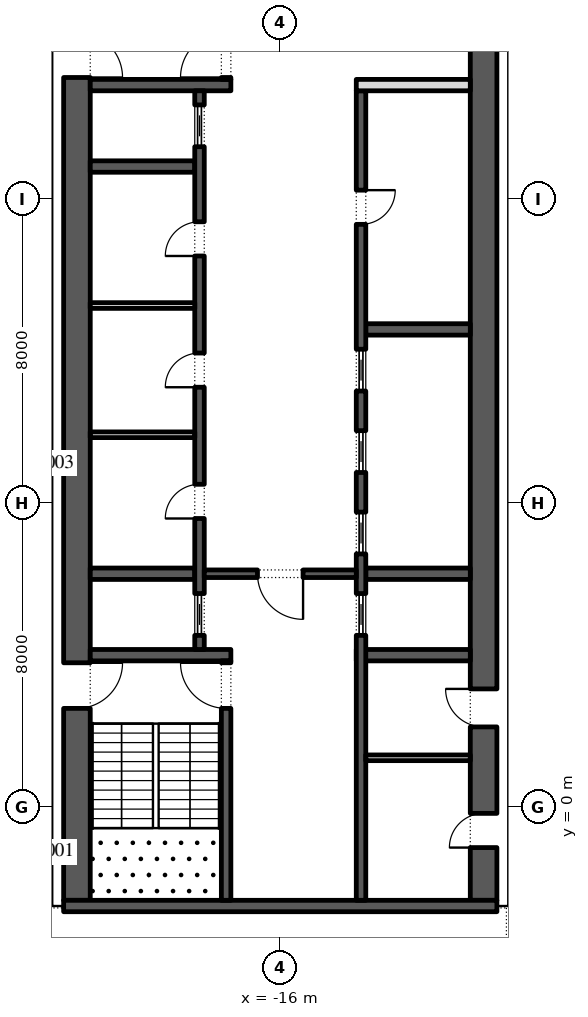
"""IFC4 building model, lengths in metres.
Left out: names, types, materials, properties, quantities, classifications, styles, units other than length and angle.
Written with IfcOpenShell. Run it as: python <this file> out.ifc"""

import sys

from ifc_helpers import new_model, si_unit, direction, frame, frame_2d, origin, place, context, subcontext, project, spatial, rectangle, extrude, element, fill, save


model = new_model("IFC4")
c1 = context("Model", 3, precision=1e-05, world=origin(), true_north=direction((0.0, 1.0)))
c2 = subcontext(c1, "Body", "Model", "MODEL_VIEW")
j1 = project(units=[si_unit("LENGTHUNIT", "METRE"), si_unit("PLANEANGLEUNIT", "RADIAN")], contexts=[c1])
p1 = place(None, origin())
s1 = spatial("IfcSite", under=j1, at=p1, CompositionType="ELEMENT")
p2 = place(p1, origin())
s2 = spatial("IfcBuilding", under=s1, at=p2, CompositionType="ELEMENT")
p3 = place(p2, frame((0.0, 0.0, 175.8)))
s3 = spatial("IfcBuildingStorey", under=s2, at=p3, CompositionType="ELEMENT", Elevation=175.8)
p4 = place(p3, frame((-33.157, 30.092, 0.0), z_axis=(0.0, 0.0, 1.0), x_axis=(0.224950279389, -0.974370243697, 0.0)))
e1 = element("IfcWall", 1, at=p4, inside=s3, PredefinedType="STANDARD", context=c2, shape_type="SweptSolid", body=[
    extrude(rectangle(XDim=49.5, YDim=0.3, at=frame_2d((24.75, 0.0))), origin(), (0.0, 0.0, 1.0), 4.0),
])
p5 = place(p4, frame((2.207, 0.0, 0.0)))
e2 = element("IfcOpeningElement", 2, at=p5, cuts=e1, PredefinedType="OPENING", context=c2, shape_type="SweptSolid", body=[
    extrude(rectangle(XDim=2.4, YDim=3.5, at=frame_2d((1.2, 1.75))), frame((0.0, 0.16, 0.0), z_axis=(0.0, -1.0, 0.0), x_axis=(1.0, 0.0, 0.0)), (0.0, 0.0, 1.0), 0.32),
])
p6 = place(p4, frame((8.121, 0.0, 0.45)))
e3 = element("IfcOpeningElement", 3, at=p6, cuts=e1, PredefinedType="OPENING", context=c2, shape_type="SweptSolid", body=[
    extrude(rectangle(XDim=4.5, YDim=2.825, at=frame_2d((2.25, 1.413))), frame((0.0, 0.16, 0.0), z_axis=(0.0, -1.0, 0.0), x_axis=(1.0, 0.0, 0.0)), (0.0, 0.0, 1.0), 0.32),
])
p7 = place(p4, frame((15.236, 0.0, 0.45)))
e4 = element("IfcOpeningElement", 4, at=p7, cuts=e1, PredefinedType="OPENING", context=c2, shape_type="SweptSolid", body=[
    extrude(rectangle(XDim=4.5, YDim=2.95, at=frame_2d((2.25, 1.475))), frame((0.0, 0.16, 0.0), z_axis=(0.0, -1.0, 0.0), x_axis=(1.0, 0.0, 0.0)), (0.0, 0.0, 1.0), 0.32),
])
p8 = place(p4, frame((22.35, 0.0, 0.45)))
e5 = element("IfcOpeningElement", 5, at=p8, cuts=e1, PredefinedType="OPENING", context=c2, shape_type="SweptSolid", body=[
    extrude(rectangle(XDim=4.5, YDim=3.0, at=frame_2d((2.25, 1.5))), frame((0.0, 0.16, 0.0), z_axis=(0.0, -1.0, 0.0), x_axis=(1.0, 0.0, 0.0)), (0.0, 0.0, 1.0), 0.32),
])
p9 = place(p4, frame((30.514, 0.0, 0.0)))
e6 = element("IfcOpeningElement", 6, at=p9, cuts=e1, PredefinedType="OPENING", context=c2, shape_type="SweptSolid", body=[
    extrude(rectangle(XDim=2.4, YDim=3.5, at=frame_2d((1.2, 1.75))), frame((0.0, 0.16, 0.0), z_axis=(0.0, -1.0, 0.0), x_axis=(1.0, 0.0, 0.0)), (0.0, 0.0, 1.0), 0.32),
])
p10 = place(p4, frame((36.579, 0.0, 0.45)))
e7 = element("IfcOpeningElement", 7, at=p10, cuts=e1, PredefinedType="OPENING", context=c2, shape_type="SweptSolid", body=[
    extrude(rectangle(XDim=4.5, YDim=3.05, at=frame_2d((2.25, 1.525))), frame((0.0, 0.16, 0.0), z_axis=(0.0, -1.0, 0.0), x_axis=(1.0, 0.0, 0.0)), (0.0, 0.0, 1.0), 0.32),
])
p11 = place(p4, frame((43.693, 0.0, 0.45)))
e8 = element("IfcOpeningElement", 8, at=p11, cuts=e1, PredefinedType="OPENING", context=c2, shape_type="SweptSolid", body=[
    extrude(rectangle(XDim=4.5, YDim=3.05, at=frame_2d((2.25, 1.525))), frame((0.0, 0.16, 0.0), z_axis=(0.0, -1.0, 0.0), x_axis=(1.0, 0.0, 0.0)), (0.0, 0.0, 1.0), 0.32),
])
p12 = place(p3, frame((-21.35, -2.45, 0.0), z_axis=(0.0, 0.0, 1.0), x_axis=(0.0, 1.0, 0.0)))
e9 = element("IfcWall", 9, at=p12, inside=s3, PredefinedType="SHEAR", context=c2, shape_type="SweptSolid", body=[
    extrude(rectangle(XDim=27.9, YDim=0.7, at=frame_2d((13.95, 0.0))), origin(), (0.0, 0.0, 1.0), 4.0),
])
p13 = place(p12, frame((5.05, 0.0, 0.0)))
e10 = element("IfcOpeningElement", 10, at=p13, cuts=e9, PredefinedType="OPENING", context=c2, shape_type="SweptSolid", body=[
    extrude(rectangle(XDim=1.2, YDim=2.1, at=frame_2d((0.6, 1.05))), frame((0.0, 0.36, 0.0), z_axis=(0.0, -1.0, 0.0), x_axis=(1.0, 0.0, 0.0)), (0.0, 0.0, 1.0), 0.72),
])
p14 = place(p12, frame((21.65, 0.0, 0.0)))
e11 = element("IfcOpeningElement", 11, at=p14, cuts=e9, PredefinedType="OPENING", context=c2, shape_type="SweptSolid", body=[
    extrude(rectangle(XDim=1.2, YDim=2.1, at=frame_2d((0.6, 1.05))), frame((0.0, 0.36, 0.0), z_axis=(0.0, -1.0, 0.0), x_axis=(1.0, 0.0, 0.0)), (0.0, 0.0, 1.0), 0.72),
])
p15 = place(p3, frame((-10.65, -2.45, 0.0), z_axis=(0.0, 0.0, 1.0), x_axis=(0.0, 1.0, 0.0)))
e12 = element("IfcWall", 12, at=p15, inside=s3, PredefinedType="SHEAR", context=c2, shape_type="SweptSolid", body=[
    extrude(rectangle(XDim=27.9, YDim=0.7, at=frame_2d((13.95, 0.0))), origin(), (0.0, 0.0, 1.0), 4.0),
])
p16 = place(p15, frame((23.65, 0.0, 0.0)))
e13 = element("IfcOpeningElement", 13, at=p16, cuts=e12, PredefinedType="OPENING", context=c2, shape_type="SweptSolid", body=[
    extrude(rectangle(XDim=2.4, YDim=2.1, at=frame_2d((1.2, 1.05))), frame((0.0, 0.36, 0.0), z_axis=(0.0, -1.0, 0.0), x_axis=(1.0, 0.0, 0.0)), (0.0, 0.0, 1.0), 0.72),
])
p17 = place(p15, frame((1.387, 0.0, 0.0)))
e14 = element("IfcOpeningElement", 14, at=p17, cuts=e12, PredefinedType="OPENING", context=c2, shape_type="SweptSolid", body=[
    extrude(rectangle(XDim=0.9, YDim=2.1, at=frame_2d((0.45, 1.05))), frame((0.0, 0.36, 0.0), z_axis=(0.0, -1.0, 0.0), x_axis=(1.0, 0.0, 0.0)), (0.0, 0.0, 1.0), 0.72),
])
p18 = place(p15, frame((4.562, 0.0, 0.0)))
e15 = element("IfcOpeningElement", 15, at=p18, cuts=e12, PredefinedType="OPENING", context=c2, shape_type="SweptSolid", body=[
    extrude(rectangle(XDim=1.0, YDim=2.1, at=frame_2d((0.5, 1.05))), frame((0.0, 0.36, 0.0), z_axis=(0.0, -1.0, 0.0), x_axis=(1.0, 0.0, 0.0)), (0.0, 0.0, 1.0), 0.72),
])
p19 = place(p3, frame((-21.7, -2.6, 0.0), z_axis=(0.0, 0.0, 1.0), x_axis=(1.0, 0.0, 0.0)))
e16 = element("IfcWall", 16, at=p19, inside=s3, PredefinedType="SHEAR", context=c2, shape_type="SweptSolid", body=[
    extrude(rectangle(XDim=11.4, YDim=0.3, at=frame_2d((5.7, 0.0))), origin(), (0.0, 0.0, 1.0), 4.0),
])
p20 = place(p3, frame((-21.0, 4.0, 0.0), z_axis=(0.0, 0.0, 1.0), x_axis=(1.0, 0.0, 0.0)))
e17 = element("IfcWall", 17, at=p20, inside=s3, PredefinedType="SHEAR", context=c2, shape_type="SweptSolid", body=[
    extrude(rectangle(XDim=3.7, YDim=0.3, at=frame_2d((1.85, 0.0))), origin(), (0.0, 0.0, 1.0), 4.0),
])
p21 = place(p3, frame((-17.425, -2.45, 0.0), z_axis=(0.0, 0.0, 1.0), x_axis=(0.0, 1.0, 0.0)))
e18 = element("IfcWall", 18, at=p21, inside=s3, PredefinedType="SHEAR", context=c2, shape_type="SweptSolid", body=[
    extrude(rectangle(XDim=6.3, YDim=0.25, at=frame_2d((3.15, 0.0))), origin(), (0.0, 0.0, 1.0), 4.0),
])
p22 = place(p21, frame((5.05, 0.0, 0.0)))
e19 = element("IfcOpeningElement", 19, at=p22, cuts=e18, PredefinedType="OPENING", context=c2, shape_type="SweptSolid", body=[
    extrude(rectangle(XDim=1.2, YDim=2.1, at=frame_2d((0.6, 1.05))), frame((0.0, 0.135, 0.0), z_axis=(0.0, -1.0, 0.0), x_axis=(1.0, 0.0, 0.0)), (0.0, 0.0, 1.0), 0.27),
])
p23 = place(p3, frame((-21.0, 19.0, 0.0), z_axis=(0.0, 0.0, 1.0), x_axis=(1.0, 0.0, 0.0)))
e20 = element("IfcWall", 20, at=p23, inside=s3, PredefinedType="SHEAR", context=c2, shape_type="SweptSolid", body=[
    extrude(rectangle(XDim=3.7, YDim=0.3, at=frame_2d((1.85, 0.0))), origin(), (0.0, 0.0, 1.0), 4.0),
])
p24 = place(p3, frame((-17.425, 19.15, 0.0), z_axis=(0.0, 0.0, 1.0), x_axis=(0.0, 1.0, 0.0)))
e21 = element("IfcWall", 21, at=p24, inside=s3, PredefinedType="SHEAR", context=c2, shape_type="SweptSolid", body=[
    extrude(rectangle(XDim=6.3, YDim=0.25, at=frame_2d((3.15, 0.0))), origin(), (0.0, 0.0, 1.0), 4.0),
])
p25 = place(p24, frame((0.05, 0.0, 0.0)))
e22 = element("IfcOpeningElement", 22, at=p25, cuts=e21, PredefinedType="OPENING", context=c2, shape_type="SweptSolid", body=[
    extrude(rectangle(XDim=1.2, YDim=2.1, at=frame_2d((0.6, 1.05))), frame((0.0, 0.135, 0.0), z_axis=(0.0, -1.0, 0.0), x_axis=(1.0, 0.0, 0.0)), (0.0, 0.0, 1.0), 0.27),
])
for number, where, z_axis, x_axis in (
    (23, (-21.0, 6.143, 0.0), (0.0, 0.0, 1.0), (1.0, 0.0, 0.0)),
    (24, (-21.0, 16.857, 0.0), (0.0, 0.0, 1.0), (1.0, 0.0, 0.0)),
):
    element("IfcWall", number, at=place(p3, frame(where, z_axis=z_axis, x_axis=x_axis)), inside=s3, PredefinedType="SHEAR", context=c2, shape_type="SweptSolid", body=[
        extrude(rectangle(XDim=2.75, YDim=0.3, at=frame_2d((1.375, 0.0))), origin(), (0.0, 0.0, 1.0), 4.0),
    ])
p26 = place(p3, frame((-18.125, 4.15, 0.0), z_axis=(0.0, 0.0, 1.0), x_axis=(0.0, 1.0, 0.0)))
e25 = element("IfcWall", 25, at=p26, inside=s3, PredefinedType="SHEAR", context=c2, shape_type="SweptSolid", body=[
    extrude(rectangle(XDim=14.7, YDim=0.25, at=frame_2d((7.35, 0.0))), origin(), (0.0, 0.0, 1.0), 4.0),
])
p27 = place(p26, frame((3.446, 0.0, 0.0)))
e26 = element("IfcOpeningElement", 26, at=p27, cuts=e25, PredefinedType="OPENING", context=c2, shape_type="SweptSolid", body=[
    extrude(rectangle(XDim=0.9, YDim=2.1, at=frame_2d((0.45, 1.05))), frame((0.0, 0.135, 0.0), z_axis=(0.0, -1.0, 0.0), x_axis=(1.0, 0.0, 0.0)), (0.0, 0.0, 1.0), 0.27),
])
p28 = place(p26, frame((6.9, 0.0, 0.0)))
e27 = element("IfcOpeningElement", 27, at=p28, cuts=e25, PredefinedType="OPENING", context=c2, shape_type="SweptSolid", body=[
    extrude(rectangle(XDim=0.9, YDim=2.1, at=frame_2d((0.45, 1.05))), frame((0.0, 0.135, 0.0), z_axis=(0.0, -1.0, 0.0), x_axis=(1.0, 0.0, 0.0)), (0.0, 0.0, 1.0), 0.27),
])
p29 = place(p26, frame((10.354, 0.0, 0.0)))
e28 = element("IfcOpeningElement", 28, at=p29, cuts=e25, PredefinedType="OPENING", context=c2, shape_type="SweptSolid", body=[
    extrude(rectangle(XDim=0.9, YDim=2.1, at=frame_2d((0.45, 1.05))), frame((0.0, 0.135, 0.0), z_axis=(0.0, -1.0, 0.0), x_axis=(1.0, 0.0, 0.0)), (0.0, 0.0, 1.0), 0.27),
])
p30 = place(p26, frame((0.371, 0.0, 0.0)))
e29 = element("IfcOpeningElement", 29, at=p30, cuts=e25, PredefinedType="OPENING", context=c2, shape_type="SweptSolid", body=[
    extrude(rectangle(XDim=1.1, YDim=2.1, at=frame_2d((0.55, 1.05))), frame((0.0, 0.135, 0.0), z_axis=(0.0, -1.0, 0.0), x_axis=(1.0, 0.0, 0.0)), (0.0, 0.0, 1.0), 0.27),
])
p31 = place(p26, frame((13.229, 0.0, 0.0)))
e30 = element("IfcOpeningElement", 30, at=p31, cuts=e25, PredefinedType="OPENING", context=c2, shape_type="SweptSolid", body=[
    extrude(rectangle(XDim=1.1, YDim=2.1, at=frame_2d((0.55, 1.05))), frame((0.0, 0.135, 0.0), z_axis=(0.0, -1.0, 0.0), x_axis=(1.0, 0.0, 0.0)), (0.0, 0.0, 1.0), 0.27),
])
for number, where, z_axis, x_axis in (
    (31, (-21.0, 9.8, 0.0), (0.0, 0.0, 1.0), (1.0, 0.0, 0.0)),
    (32, (-21.0, 13.2, 0.0), (0.0, 0.0, 1.0), (1.0, 0.0, 0.0)),
):
    element("IfcWall", number, at=place(p3, frame(where, z_axis=z_axis, x_axis=x_axis)), inside=s3, PredefinedType="PARTITIONING", context=c2, shape_type="SweptSolid", body=[
        extrude(rectangle(XDim=2.75, YDim=0.15, at=frame_2d((1.375, 0.0))), origin(), (0.0, 0.0, 1.0), 4.0),
    ])
p32 = place(p3, frame((-14.0, 4.0, 0.0), z_axis=(0.0, 0.0, 1.0), x_axis=(1.0, 0.0, 0.0)))
e33 = element("IfcWall", 33, at=p32, inside=s3, PredefinedType="SHEAR", context=c2, shape_type="SweptSolid", body=[
    extrude(rectangle(XDim=3.0, YDim=0.3, at=frame_2d((1.5, 0.0))), origin(), (0.0, 0.0, 1.0), 4.0),
])
for number, where, z_axis, x_axis in (
    (34, (-13.75, 6.143, 0.0), (0.0, 0.0, 1.0), (1.0, 0.0, 0.0)),
    (35, (-13.75, 12.571, 0.0), (0.0, 0.0, 1.0), (1.0, 0.0, 0.0)),
):
    element("IfcWall", number, at=place(p3, frame(where, z_axis=z_axis, x_axis=x_axis)), inside=s3, PredefinedType="SHEAR", context=c2, shape_type="SweptSolid", body=[
        extrude(rectangle(XDim=2.75, YDim=0.3, at=frame_2d((1.375, 0.0))), origin(), (0.0, 0.0, 1.0), 4.0),
    ])
p33 = place(p3, frame((-13.875, -2.45, 0.0), z_axis=(0.0, 0.0, 1.0), x_axis=(0.0, 1.0, 0.0)))
e36 = element("IfcWall", 36, at=p33, inside=s3, PredefinedType="SHEAR", context=c2, shape_type="SweptSolid", body=[
    extrude(rectangle(XDim=21.3, YDim=0.25, at=frame_2d((10.65, 0.0))), origin(), (0.0, 0.0, 1.0), 4.0),
])
p34 = place(p33, frame((17.786, 0.0, 0.0)))
e37 = element("IfcOpeningElement", 37, at=p34, cuts=e36, PredefinedType="OPENING", context=c2, shape_type="SweptSolid", body=[
    extrude(rectangle(XDim=0.9, YDim=2.1, at=frame_2d((0.45, 1.05))), frame((0.0, 0.135, 0.0), z_axis=(0.0, -1.0, 0.0), x_axis=(1.0, 0.0, 0.0)), (0.0, 0.0, 1.0), 0.27),
])
p35 = place(p33, frame((6.971, 0.0, 0.0)))
e38 = element("IfcOpeningElement", 38, at=p35, cuts=e36, PredefinedType="OPENING", context=c2, shape_type="SweptSolid", body=[
    extrude(rectangle(XDim=1.1, YDim=2.1, at=frame_2d((0.55, 1.05))), frame((0.0, 0.135, 0.0), z_axis=(0.0, -1.0, 0.0), x_axis=(1.0, 0.0, 0.0)), (0.0, 0.0, 1.0), 0.27),
])
p36 = place(p33, frame((9.114, 0.0, 0.0)))
e39 = element("IfcOpeningElement", 39, at=p36, cuts=e36, PredefinedType="OPENING", context=c2, shape_type="SweptSolid", body=[
    extrude(rectangle(XDim=1.1, YDim=2.1, at=frame_2d((0.55, 1.05))), frame((0.0, 0.135, 0.0), z_axis=(0.0, -1.0, 0.0), x_axis=(1.0, 0.0, 0.0)), (0.0, 0.0, 1.0), 0.27),
])
p37 = place(p33, frame((11.257, 0.0, 0.0)))
e40 = element("IfcOpeningElement", 40, at=p37, cuts=e36, PredefinedType="OPENING", context=c2, shape_type="SweptSolid", body=[
    extrude(rectangle(XDim=1.1, YDim=2.1, at=frame_2d((0.55, 1.05))), frame((0.0, 0.135, 0.0), z_axis=(0.0, -1.0, 0.0), x_axis=(1.0, 0.0, 0.0)), (0.0, 0.0, 1.0), 0.27),
])
p38 = place(p33, frame((13.4, 0.0, 0.0)))
e41 = element("IfcOpeningElement", 41, at=p38, cuts=e36, PredefinedType="OPENING", context=c2, shape_type="SweptSolid", body=[
    extrude(rectangle(XDim=1.1, YDim=2.1, at=frame_2d((0.55, 1.05))), frame((0.0, 0.135, 0.0), z_axis=(0.0, -1.0, 0.0), x_axis=(1.0, 0.0, 0.0)), (0.0, 0.0, 1.0), 0.27),
])
p39 = place(p3, frame((-14.0, 19.0, 0.0), z_axis=(0.0, 0.0, 1.0), x_axis=(1.0, 0.0, 0.0)))
e42 = element("IfcWall", 42, at=p39, inside=s3, PredefinedType="PARTITIONING", context=c2, shape_type="SweptSolid", body=[
    extrude(rectangle(XDim=3.0, YDim=0.3, at=frame_2d((1.5, 0.0))), origin(), (0.0, 0.0, 1.0), 4.0),
])
p40 = place(p3, frame((-18.0, 6.143, 0.0), z_axis=(0.0, 0.0, 1.0), x_axis=(1.0, 0.0, 0.0)))
e43 = element("IfcWall", 43, at=p40, inside=s3, PredefinedType="SHEAR", context=c2, shape_type="SweptSolid", body=[
    extrude(rectangle(XDim=4.0, YDim=0.2, at=frame_2d((2.0, 0.0))), origin(), (0.0, 0.0, 1.0), 4.0),
])
p41 = place(p40, frame((1.4, 0.0, 0.0)))
e44 = element("IfcOpeningElement", 44, at=p41, cuts=e43, PredefinedType="OPENING", context=c2, shape_type="SweptSolid", body=[
    extrude(rectangle(XDim=1.2, YDim=2.1, at=frame_2d((0.6, 1.05))), frame((0.0, 0.11, 0.0), z_axis=(0.0, -1.0, 0.0), x_axis=(1.0, 0.0, 0.0)), (0.0, 0.0, 1.0), 0.22),
])
p42 = place(p3, frame((-13.75, 1.3, 0.0), z_axis=(0.0, 0.0, 1.0), x_axis=(1.0, 0.0, 0.0)))
e45 = element("IfcWall", 45, at=p42, inside=s3, PredefinedType="PARTITIONING", context=c2, shape_type="SweptSolid", body=[
    extrude(rectangle(XDim=2.75, YDim=0.15, at=frame_2d((1.375, 0.0))), origin(), (0.0, 0.0, 1.0), 4.0),
])
p43 = place(p27, origin())
e46 = element("IfcDoor", 46, at=p43, inside=s3, OperationType="SINGLE_SWING_RIGHT", PredefinedType="DOOR", context=c2, shape_type="SweptSolid", body=[
    extrude(rectangle(XDim=0.9, YDim=2.1, at=frame_2d((0.45, 1.05))), frame((0.0, 0.125, 0.0), z_axis=(0.0, -1.0, 0.0), x_axis=(1.0, 0.0, 0.0)), (0.0, 0.0, 1.0), 0.05),
])
fill(e26, e46)
p44 = place(p28, origin())
e47 = element("IfcDoor", 47, at=p44, inside=s3, OperationType="SINGLE_SWING_RIGHT", PredefinedType="DOOR", context=c2, shape_type="SweptSolid", body=[
    extrude(rectangle(XDim=0.9, YDim=2.1, at=frame_2d((0.45, 1.05))), frame((0.0, 0.125, 0.0), z_axis=(0.0, -1.0, 0.0), x_axis=(1.0, 0.0, 0.0)), (0.0, 0.0, 1.0), 0.05),
])
fill(e27, e47)
p45 = place(p29, origin())
e48 = element("IfcDoor", 48, at=p45, inside=s3, OperationType="SINGLE_SWING_RIGHT", PredefinedType="DOOR", context=c2, shape_type="SweptSolid", body=[
    extrude(rectangle(XDim=0.9, YDim=2.1, at=frame_2d((0.45, 1.05))), frame((0.0, 0.125, 0.0), z_axis=(0.0, -1.0, 0.0), x_axis=(1.0, 0.0, 0.0)), (0.0, 0.0, 1.0), 0.05),
])
fill(e28, e48)
p46 = place(p30, origin())
e49 = element("IfcDoor", 49, at=p46, inside=s3, OperationType="SLIDING_TO_LEFT", PredefinedType="DOOR", context=c2, shape_type="SweptSolid", body=[
    extrude(rectangle(XDim=1.1, YDim=2.1, at=frame_2d((0.55, 1.05))), frame((0.0, 0.025, 0.0), z_axis=(0.0, -1.0, 0.0), x_axis=(1.0, 0.0, 0.0)), (0.0, 0.0, 1.0), 0.05),
])
fill(e29, e49)
p47 = place(p31, origin())
e50 = element("IfcDoor", 50, at=p47, inside=s3, OperationType="SLIDING_TO_LEFT", PredefinedType="DOOR", context=c2, shape_type="SweptSolid", body=[
    extrude(rectangle(XDim=1.1, YDim=2.1, at=frame_2d((0.55, 1.05))), frame((0.0, 0.025, 0.0), z_axis=(0.0, -1.0, 0.0), x_axis=(1.0, 0.0, 0.0)), (0.0, 0.0, 1.0), 0.05),
])
fill(e30, e50)
p48 = place(p34, frame((0.9, -0.2, 0.0), z_axis=(0.0, 0.0, 1.0), x_axis=(-1.0, 0.0, 0.0)))
e51 = element("IfcDoor", 51, at=p48, inside=s3, OperationType="SINGLE_SWING_RIGHT", PredefinedType="DOOR", context=c2, shape_type="SweptSolid", body=[
    extrude(rectangle(XDim=0.9, YDim=2.1, at=frame_2d((0.45, 1.05))), frame((0.0, -0.075, 0.0), z_axis=(0.0, -1.0, 0.0), x_axis=(1.0, 0.0, 0.0)), (0.0, 0.0, 1.0), 0.05),
])
fill(e37, e51)
p49 = place(p35, origin())
e52 = element("IfcDoor", 52, at=p49, inside=s3, OperationType="SLIDING_TO_LEFT", PredefinedType="DOOR", context=c2, shape_type="SweptSolid", body=[
    extrude(rectangle(XDim=1.1, YDim=2.1, at=frame_2d((0.55, 1.05))), frame((0.0, 0.025, 0.0), z_axis=(0.0, -1.0, 0.0), x_axis=(1.0, 0.0, 0.0)), (0.0, 0.0, 1.0), 0.05),
])
fill(e38, e52)
p50 = place(p36, origin())
e53 = element("IfcDoor", 53, at=p50, inside=s3, OperationType="SLIDING_TO_LEFT", PredefinedType="DOOR", context=c2, shape_type="SweptSolid", body=[
    extrude(rectangle(XDim=1.1, YDim=2.1, at=frame_2d((0.55, 1.05))), frame((0.0, 0.025, 0.0), z_axis=(0.0, -1.0, 0.0), x_axis=(1.0, 0.0, 0.0)), (0.0, 0.0, 1.0), 0.05),
])
fill(e39, e53)
p51 = place(p37, origin())
e54 = element("IfcDoor", 54, at=p51, inside=s3, OperationType="SLIDING_TO_LEFT", PredefinedType="DOOR", context=c2, shape_type="SweptSolid", body=[
    extrude(rectangle(XDim=1.1, YDim=2.1, at=frame_2d((0.55, 1.05))), frame((0.0, 0.025, 0.0), z_axis=(0.0, -1.0, 0.0), x_axis=(1.0, 0.0, 0.0)), (0.0, 0.0, 1.0), 0.05),
])
fill(e40, e54)
p52 = place(p38, origin())
e55 = element("IfcDoor", 55, at=p52, inside=s3, OperationType="SLIDING_TO_LEFT", PredefinedType="DOOR", context=c2, shape_type="SweptSolid", body=[
    extrude(rectangle(XDim=1.1, YDim=2.1, at=frame_2d((0.55, 1.05))), frame((0.0, 0.025, 0.0), z_axis=(0.0, -1.0, 0.0), x_axis=(1.0, 0.0, 0.0)), (0.0, 0.0, 1.0), 0.05),
])
fill(e41, e55)
p53 = place(p41, frame((1.2, 0.0, 0.0), z_axis=(0.0, 0.0, 1.0), x_axis=(-1.0, 0.0, 0.0)))
e56 = element("IfcDoor", 56, at=p53, inside=s3, OperationType="SINGLE_SWING_RIGHT", PredefinedType="DOOR", context=c2, shape_type="SweptSolid", body=[
    extrude(rectangle(XDim=1.2, YDim=2.1, at=frame_2d((0.6, 1.05))), frame((0.0, 0.025, 0.0), z_axis=(0.0, -1.0, 0.0), x_axis=(1.0, 0.0, 0.0)), (0.0, 0.0, 1.0), 0.05),
])
fill(e44, e56)
p54 = place(p22, origin())
e57 = element("IfcDoor", 57, at=p54, inside=s3, OperationType="SINGLE_SWING_LEFT", PredefinedType="DOOR", context=c2, shape_type="SweptSolid", body=[
    extrude(rectangle(XDim=1.2, YDim=2.1, at=frame_2d((0.6, 1.05))), frame((0.0, 0.025, 0.0), z_axis=(0.0, -1.0, 0.0), x_axis=(1.0, 0.0, 0.0)), (0.0, 0.0, 1.0), 0.05),
])
fill(e19, e57)
p55 = place(p13, frame((1.2, 0.0, 0.0), z_axis=(0.0, 0.0, 1.0), x_axis=(-1.0, 0.0, 0.0)))
e58 = element("IfcDoor", 58, at=p55, inside=s3, OperationType="SINGLE_SWING_RIGHT", PredefinedType="DOOR", context=c2, shape_type="SweptSolid", body=[
    extrude(rectangle(XDim=1.2, YDim=2.1, at=frame_2d((0.6, 1.05))), frame((0.0, 0.025, 0.0), z_axis=(0.0, -1.0, 0.0), x_axis=(1.0, 0.0, 0.0)), (0.0, 0.0, 1.0), 0.05),
])
fill(e10, e58)
p56 = place(p25, origin())
e59 = element("IfcDoor", 59, at=p56, inside=s3, OperationType="SINGLE_SWING_RIGHT", PredefinedType="DOOR", context=c2, shape_type="SweptSolid", body=[
    extrude(rectangle(XDim=1.2, YDim=2.1, at=frame_2d((0.6, 1.05))), frame((0.0, 0.025, 0.0), z_axis=(0.0, -1.0, 0.0), x_axis=(1.0, 0.0, 0.0)), (0.0, 0.0, 1.0), 0.05),
])
fill(e22, e59)
p57 = place(p14, frame((1.2, 0.0, 0.0), z_axis=(0.0, 0.0, 1.0), x_axis=(-1.0, 0.0, 0.0)))
e60 = element("IfcDoor", 60, at=p57, inside=s3, OperationType="SINGLE_SWING_LEFT", PredefinedType="DOOR", context=c2, shape_type="SweptSolid", body=[
    extrude(rectangle(XDim=1.2, YDim=2.1, at=frame_2d((0.6, 1.05))), frame((0.0, 0.025, 0.0), z_axis=(0.0, -1.0, 0.0), x_axis=(1.0, 0.0, 0.0)), (0.0, 0.0, 1.0), 0.05),
])
fill(e11, e60)
p58 = place(p17, origin())
e61 = element("IfcDoor", 61, at=p58, inside=s3, OperationType="SINGLE_SWING_RIGHT", PredefinedType="DOOR", context=c2, shape_type="SweptSolid", body=[
    extrude(rectangle(XDim=0.9, YDim=2.1, at=frame_2d((0.45, 1.05))), frame((0.0, 0.35, 0.0), z_axis=(0.0, -1.0, 0.0), x_axis=(1.0, 0.0, 0.0)), (0.0, 0.0, 1.0), 0.05),
])
fill(e14, e61)
p59 = place(p18, origin())
e62 = element("IfcDoor", 62, at=p59, inside=s3, OperationType="SINGLE_SWING_LEFT", PredefinedType="DOOR", context=c2, shape_type="SweptSolid", body=[
    extrude(rectangle(XDim=1.0, YDim=2.1, at=frame_2d((0.5, 1.05))), frame((0.0, 0.35, 0.0), z_axis=(0.0, -1.0, 0.0), x_axis=(1.0, 0.0, 0.0)), (0.0, 0.0, 1.0), 0.05),
])
fill(e15, e62)
save(model, sys.argv[1])
